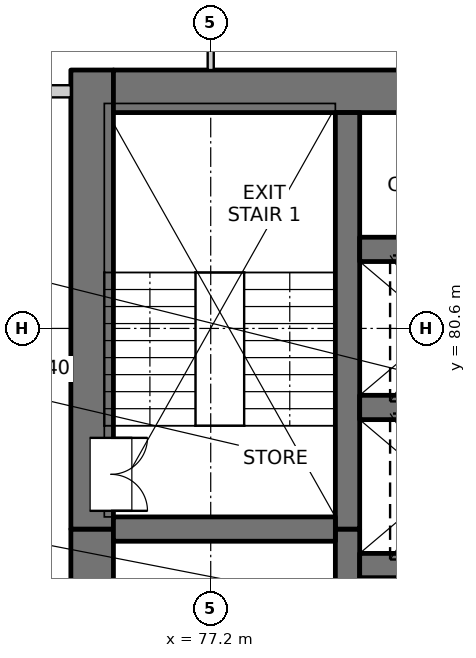
"""IFC4 building model, lengths in metres.
Left out: names, types, materials, properties, quantities, classifications, styles, units other than length and angle.
Written with IfcOpenShell. Run it as: python <this file> out.ifc"""

import sys

from ifc_helpers import new_model, si_unit, direction, frame, frame_2d, origin, place, context, subcontext, project, spatial, rectangle, extrude, element, fill, save


model = new_model("IFC4")
c1 = context("Model", 3, precision=1e-05, world=origin(), true_north=direction((0.0, 1.0)))
c2 = subcontext(c1, "Body", "Model", "MODEL_VIEW")
j1 = project(units=[si_unit("LENGTHUNIT", "METRE"), si_unit("PLANEANGLEUNIT", "RADIAN")], contexts=[c1])
p1 = place(None, origin())
s1 = spatial("IfcSite", under=j1, at=p1, CompositionType="ELEMENT")
p2 = place(p1, origin())
s2 = spatial("IfcBuilding", under=s1, at=p2, CompositionType="ELEMENT")
p3 = place(p2, frame((0.0, 0.0, 29.7)))
s3 = spatial("IfcBuildingStorey", under=s2, at=p3, CompositionType="ELEMENT", Elevation=29.7)
p4 = place(p3, frame((75.25, 54.9, -0.25), z_axis=(0.0, 0.0, 1.0), x_axis=(0.0, 1.0, 0.0)))
e1 = element("IfcWall", 1, at=p4, inside=s3, PredefinedType="SOLIDWALL", context=c2, shape_type="SweptSolid", body=[
    extrude(rectangle(XDim=22.4, YDim=0.7, at=frame_2d((11.2, 0.0))), origin(), (0.0, 0.0, 1.0), 3.4),
])
p5 = place(p4, frame((7.55, 0.0, 0.25)))
e2 = element("IfcOpeningElement", 2, at=p5, cuts=e1, PredefinedType="OPENING", context=c2, shape_type="SweptSolid", body=[
    extrude(rectangle(XDim=0.9, YDim=2.1, at=frame_2d((0.45, 1.05))), frame((0.0, 0.36, 0.0), z_axis=(0.0, -1.0, 0.0), x_axis=(1.0, 0.0, 0.0)), (0.0, 0.0, 1.0), 0.72),
])
p6 = place(p4, frame((10.85, 0.0, 0.25)))
e3 = element("IfcOpeningElement", 3, at=p6, cuts=e1, PredefinedType="OPENING", context=c2, shape_type="SweptSolid", body=[
    extrude(rectangle(XDim=0.9, YDim=2.1, at=frame_2d((0.45, 1.05))), frame((0.0, 0.36, 0.0), z_axis=(0.0, -1.0, 0.0), x_axis=(1.0, 0.0, 0.0)), (0.0, 0.0, 1.0), 0.72),
])
p7 = place(p4, frame((13.85, 0.0, 0.25)))
e4 = element("IfcOpeningElement", 4, at=p7, cuts=e1, PredefinedType="OPENING", context=c2, shape_type="SweptSolid", body=[
    extrude(rectangle(XDim=0.9, YDim=2.1, at=frame_2d((0.45, 1.05))), frame((0.0, 0.36, 0.0), z_axis=(0.0, -1.0, 0.0), x_axis=(1.0, 0.0, 0.0)), (0.0, 0.0, 1.0), 0.72),
])
p8 = place(p4, frame((16.85, 0.0, 0.25)))
e5 = element("IfcOpeningElement", 5, at=p8, cuts=e1, PredefinedType="OPENING", context=c2, shape_type="SweptSolid", body=[
    extrude(rectangle(XDim=0.9, YDim=2.1, at=frame_2d((0.45, 1.05))), frame((0.0, 0.36, 0.0), z_axis=(0.0, -1.0, 0.0), x_axis=(1.0, 0.0, 0.0)), (0.0, 0.0, 1.0), 0.72),
])
p9 = place(p4, frame((20.15, 0.0, 0.25)))
e6 = element("IfcOpeningElement", 6, at=p9, cuts=e1, PredefinedType="OPENING", context=c2, shape_type="SweptSolid", body=[
    extrude(rectangle(XDim=0.9, YDim=2.1, at=frame_2d((0.45, 1.05))), frame((0.0, 0.36, 0.0), z_axis=(0.0, -1.0, 0.0), x_axis=(1.0, 0.0, 0.0)), (0.0, 0.0, 1.0), 0.72),
])
p10 = place(p3, frame((75.25, 77.3, -0.25), z_axis=(0.0, 0.0, 1.0), x_axis=(0.0, 1.0, 0.0)))
e7 = element("IfcWall", 7, at=p10, inside=s3, PredefinedType="SOLIDWALL", context=c2, shape_type="SweptSolid", body=[
    extrude(rectangle(XDim=7.55, YDim=0.7, at=frame_2d((3.775, 0.0))), origin(), (0.0, 0.0, 1.0), 3.4),
])
p11 = place(p10, frame((0.3, 0.0, 0.25)))
e8 = element("IfcOpeningElement", 8, at=p11, cuts=e7, PredefinedType="OPENING", context=c2, shape_type="SweptSolid", body=[
    extrude(rectangle(XDim=1.2, YDim=2.1, at=frame_2d((0.6, 1.05))), frame((0.0, 0.36, 0.0), z_axis=(0.0, -1.0, 0.0), x_axis=(1.0, 0.0, 0.0)), (0.0, 0.0, 1.0), 0.72),
])
p12 = place(p3, frame((75.6, 84.5, -0.25), z_axis=(0.0, 0.0, 1.0), x_axis=(1.0, 0.0, 0.0)))
e9 = element("IfcWall", 9, at=p12, inside=s3, PredefinedType="SOLIDWALL", context=c2, shape_type="SweptSolid", body=[
    extrude(rectangle(XDim=18.8, YDim=0.7, at=frame_2d((9.4, 0.0))), origin(), (0.0, 0.0, 1.0), 3.4),
])
p13 = place(p3, frame((79.45, 60.9, -0.25), z_axis=(0.0, 0.0, 1.0), x_axis=(0.0, 1.0, 0.0)))
e10 = element("IfcWall", 10, at=p13, inside=s3, PredefinedType="SOLIDWALL", context=c2, shape_type="SweptSolid", body=[
    extrude(rectangle(XDim=16.4, YDim=0.4, at=frame_2d((8.2, 0.0))), origin(), (0.0, 0.0, 1.0), 3.4),
])
p14 = place(p3, frame((79.45, 77.3, -0.25), z_axis=(0.0, 0.0, 1.0), x_axis=(0.0, 1.0, 0.0)))
e11 = element("IfcWall", 11, at=p14, inside=s3, PredefinedType="SOLIDWALL", context=c2, shape_type="SweptSolid", body=[
    extrude(rectangle(XDim=6.85, YDim=0.4, at=frame_2d((3.425, 0.0))), origin(), (0.0, 0.0, 1.0), 3.4),
])
for number, where, z_axis, x_axis in (
    (12, (79.65, 76.7, -0.25), (0.0, 0.0, 1.0), (1.0, 0.0, 0.0)),
    (13, (79.65, 79.3, -0.25), (0.0, 0.0, 1.0), (1.0, 0.0, 0.0)),
    (14, (79.65, 81.9, -0.25), (0.0, 0.0, 1.0), (1.0, 0.0, 0.0)),
):
    element("IfcWall", number, at=place(p3, frame(where, z_axis=z_axis, x_axis=x_axis)), inside=s3, PredefinedType="SOLIDWALL", context=c2, shape_type="SweptSolid", body=[
        extrude(rectangle(XDim=3.0, YDim=0.4, at=frame_2d((1.5, 0.0))), origin(), (0.0, 0.0, 1.0), 3.4),
    ])
p15 = place(p3, frame((75.6, 77.3, -0.25), z_axis=(0.0, 0.0, 1.0), x_axis=(1.0, 0.0, 0.0)))
e15 = element("IfcWall", 15, at=p15, inside=s3, PredefinedType="SOLIDWALL", context=c2, shape_type="SweptSolid", body=[
    extrude(rectangle(XDim=3.65, YDim=0.4, at=frame_2d((1.825, 0.0))), origin(), (0.0, 0.0, 1.0), 3.4),
])
p16 = place(p3, frame((73.2, 84.5, 0.0), z_axis=(0.0, 0.0, 1.0), x_axis=(1.0, 0.0, 0.0)))
e16 = element("IfcWall", 16, at=p16, inside=s3, PredefinedType="PARTITIONING", context=c2, shape_type="SweptSolid", body=[
    extrude(rectangle(XDim=1.7, YDim=0.2, at=frame_2d((0.85, 0.0))), origin(), (0.0, 0.0, 1.0), 3.15),
])
p17 = place(p3, frame((77.2, 84.85, 0.0), z_axis=(0.0, 0.0, 1.0), x_axis=(0.0, 1.0, 0.0)))
e17 = element("IfcWall", 17, at=p17, inside=s3, PredefinedType="PARTITIONING", context=c2, shape_type="SweptSolid", body=[
    extrude(rectangle(XDim=3.25, YDim=0.1, at=frame_2d((1.625, 0.0))), origin(), (0.0, 0.0, 1.0), 3.15),
])
p18 = place(p17, frame((1.15, 0.0, 0.0)))
e18 = element("IfcOpeningElement", 18, at=p18, cuts=e17, PredefinedType="OPENING", context=c2, shape_type="SweptSolid", body=[
    extrude(rectangle(XDim=0.9, YDim=2.1, at=frame_2d((0.45, 1.05))), frame((0.0, 0.06, 0.0), z_axis=(0.0, -1.0, 0.0), x_axis=(1.0, 0.0, 0.0)), (0.0, 0.0, 1.0), 0.12),
])
p19 = place(p11, origin())
e19 = element("IfcDoor", 19, at=p19, inside=s3, OperationType="DOUBLE_DOOR_SINGLE_SWING", PredefinedType="DOOR", context=c2, shape_type="SweptSolid", body=[
    extrude(rectangle(XDim=1.2, YDim=2.1, at=frame_2d((0.6, 1.05))), frame((0.0, -0.285, 0.0), z_axis=(0.0, -1.0, 0.0), x_axis=(1.0, 0.0, 0.0)), (0.0, 0.0, 1.0), 0.05),
])
fill(e8, e19)
save(model, sys.argv[1])
